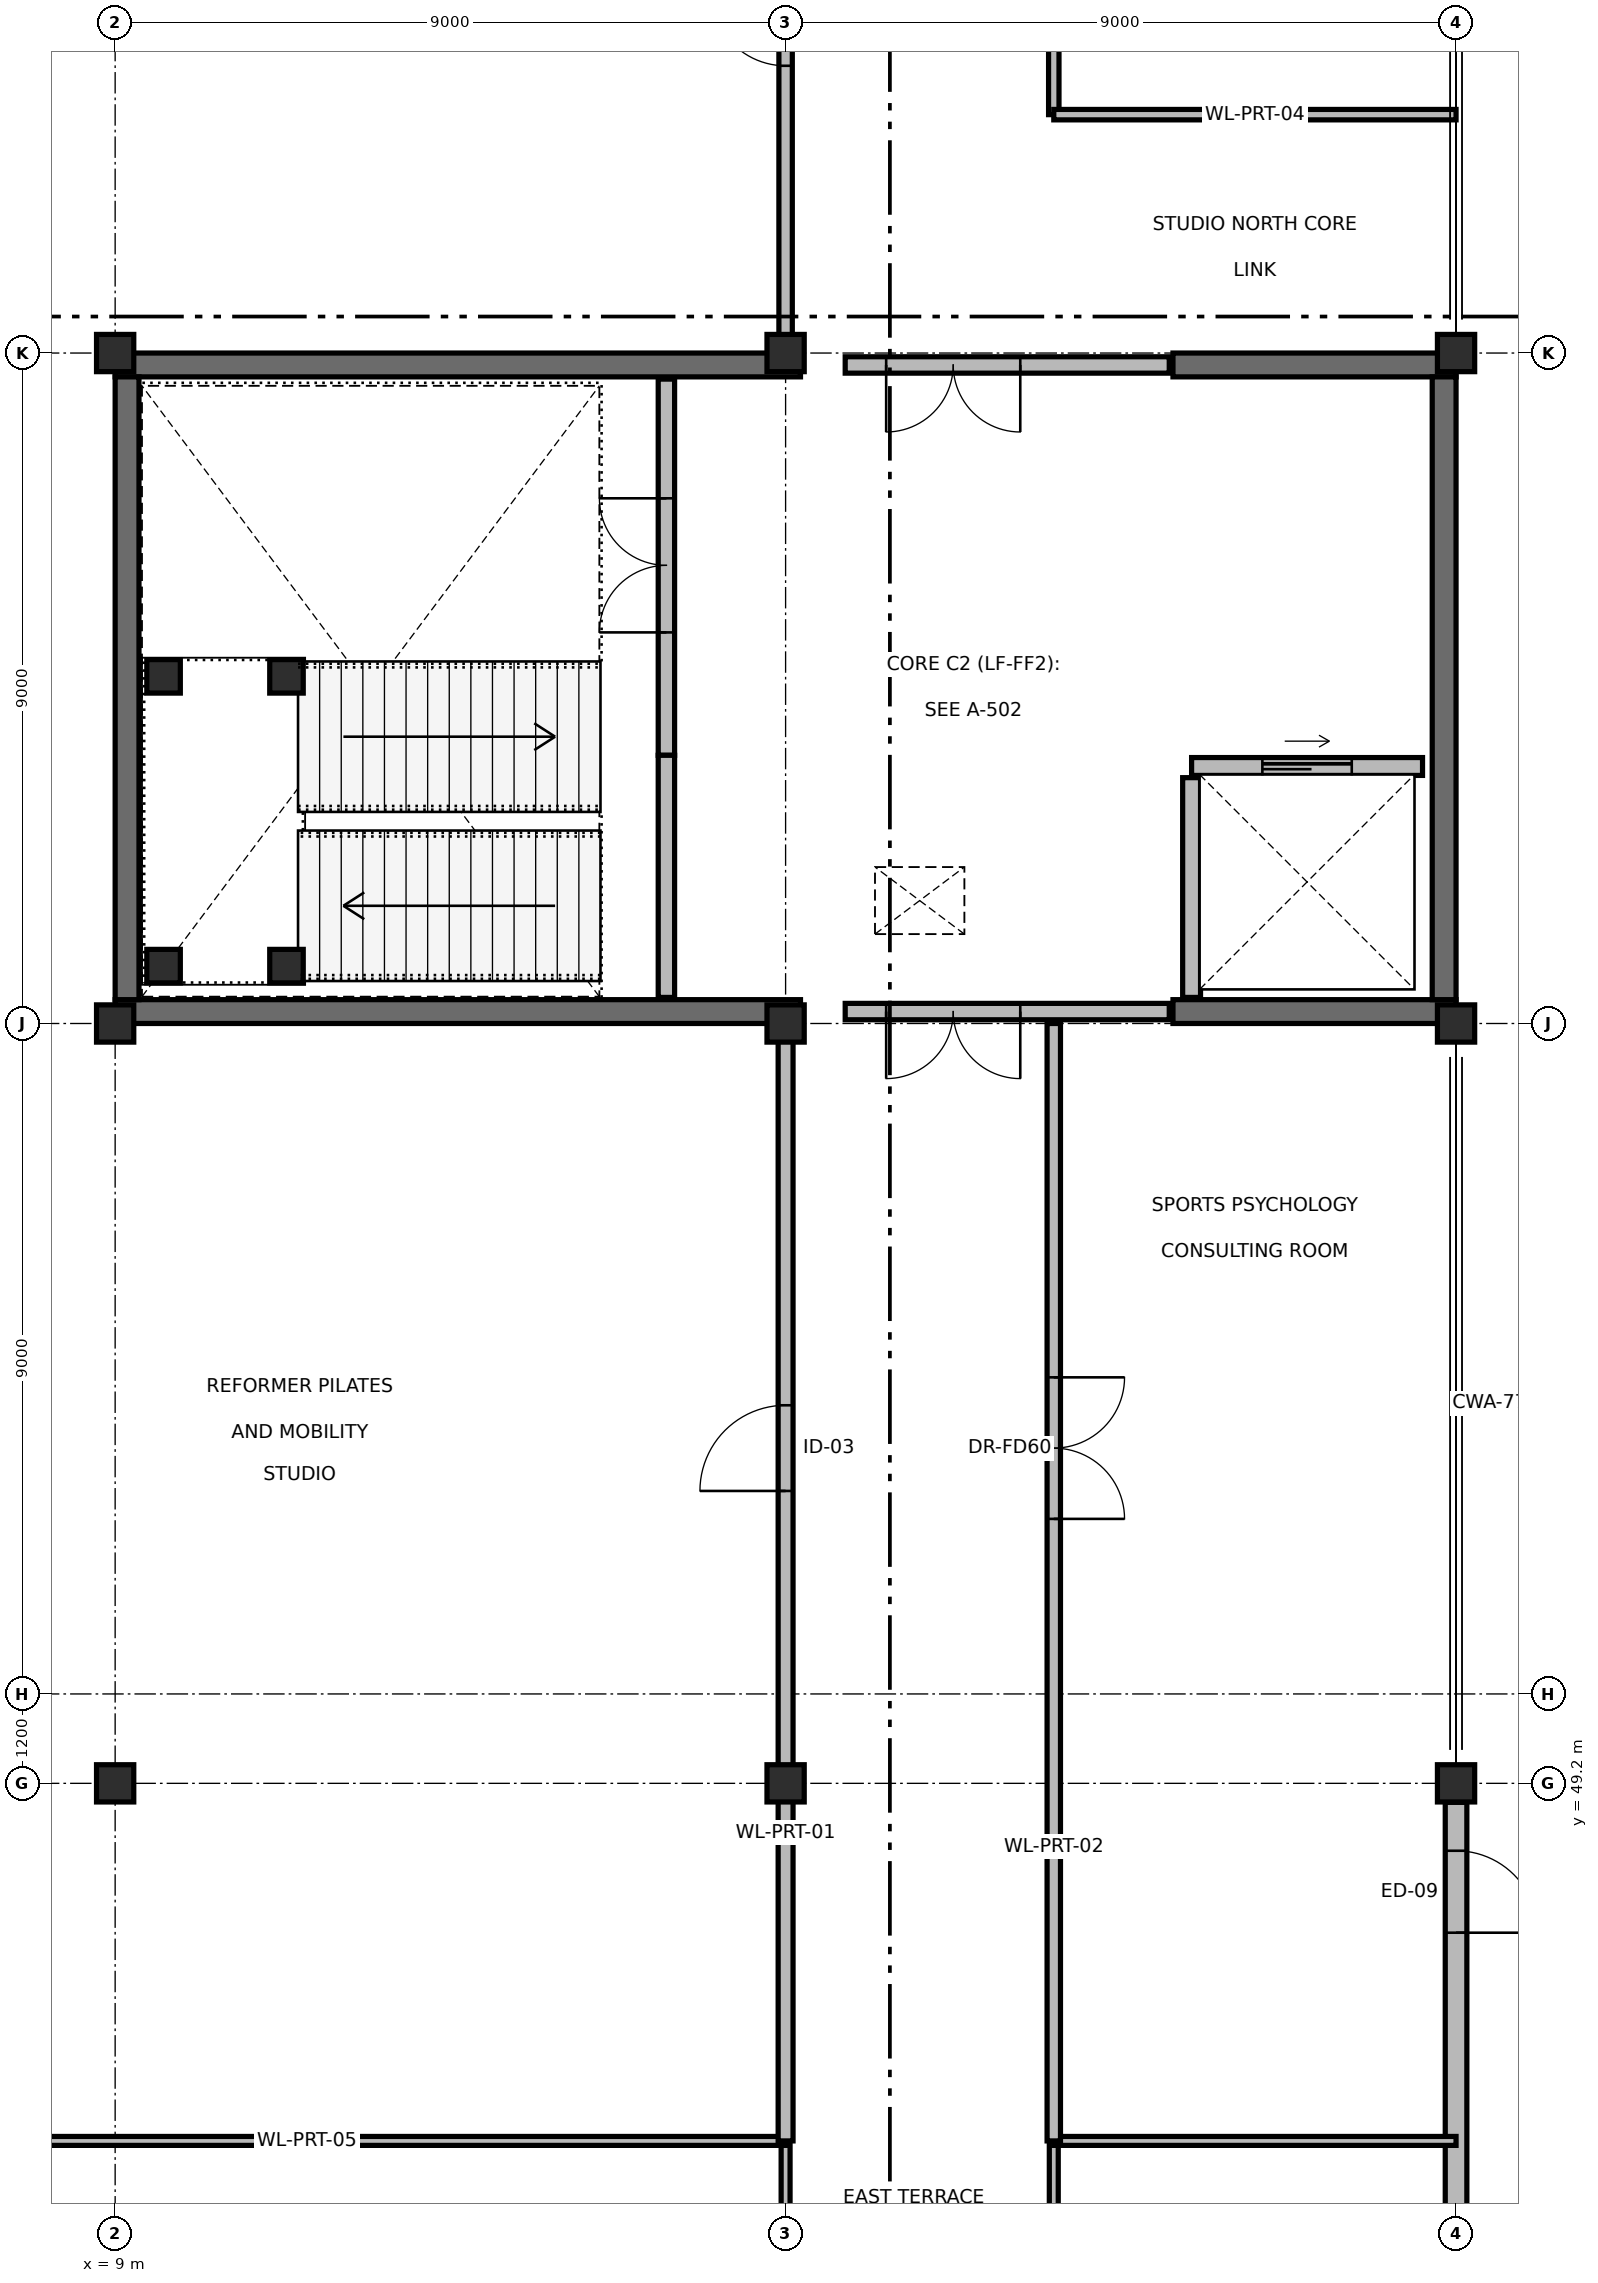
"""IFC4 building model, lengths in metres.
Left out: names, types, materials, properties, quantities, classifications, styles, units other than length and angle.
Written with IfcOpenShell. Run it as: python <this file> out.ifc"""

import sys

from ifc_helpers import new_model, si_unit, direction, frame, frame_2d, origin, origin_2d, place, context, subcontext, project, spatial, rectangle, extrude, element, fill, save


model = new_model("IFC4")
c1 = context("Model", 3, precision=1e-05, world=origin(), true_north=direction((0.0, 1.0)))
c2 = subcontext(c1, "Body", "Model", "MODEL_VIEW")
j1 = project(units=[si_unit("LENGTHUNIT", "METRE"), si_unit("PLANEANGLEUNIT", "RADIAN")], contexts=[c1])
p1 = place(None, origin())
s1 = spatial("IfcSite", under=j1, at=p1, CompositionType="ELEMENT")
p2 = place(p1, origin())
s2 = spatial("IfcBuilding", under=s1, at=p2, CompositionType="ELEMENT")
p3 = place(p2, frame((0.0, 0.0, 14.1)))
s3 = spatial("IfcBuildingStorey", under=s2, at=p3, CompositionType="ELEMENT", Elevation=14.1)
for number, where, z_axis, x_axis in (
    (1, (9.0, 49.2, 0.0), (0.0, 0.0, 1.0), (1.0, 0.0, 0.0)),
    (2, (9.0, 59.4, 0.0), (0.0, 0.0, 1.0), (1.0, 0.0, 0.0)),
    (3, (9.0, 68.4, 0.0), (0.0, 0.0, 1.0), (1.0, 0.0, 0.0)),
    (4, (18.0, 49.2, 0.0), (0.0, 0.0, 1.0), (1.0, 0.0, 0.0)),
    (5, (18.0, 59.4, 0.0), (0.0, 0.0, 1.0), (1.0, 0.0, 0.0)),
    (6, (18.0, 68.4, 0.0), (0.0, 0.0, 1.0), (1.0, 0.0, 0.0)),
    (7, (27.0, 49.2, 0.0), (0.0, 0.0, 1.0), (1.0, 0.0, 0.0)),
    (8, (27.0, 59.4, 0.0), (0.0, 0.0, 1.0), (1.0, 0.0, 0.0)),
    (9, (27.0, 68.4, 0.0), (0.0, 0.0, 1.0), (1.0, 0.0, 0.0)),
):
    element("IfcColumn", number, at=place(p3, frame(where, z_axis=z_axis, x_axis=x_axis)), inside=s3, PredefinedType="COLUMN", context=c2, shape_type="SweptSolid", body=[
        extrude(rectangle(XDim=0.5, YDim=0.5, at=origin_2d()), origin(), (0.0, 0.0, 1.0), 4.5),
    ])
p4 = place(p3, frame((9.0, 59.56, 0.0), z_axis=(0.0, 0.0, 1.0), x_axis=(1.0, 0.0, 0.0)))
e10 = element("IfcWall", 10, at=p4, inside=s3, PredefinedType="SHEAR", context=c2, shape_type="SweptSolid", body=[
    extrude(rectangle(XDim=9.2, YDim=0.32, at=frame_2d((4.6, 0.0))), origin(), (0.0, 0.0, 1.0), 4.5),
])
p5 = place(p3, frame((23.2, 59.56, 0.0), z_axis=(0.0, 0.0, 1.0), x_axis=(1.0, 0.0, 0.0)))
e11 = element("IfcWall", 11, at=p5, inside=s3, PredefinedType="SHEAR", context=c2, shape_type="SweptSolid", body=[
    extrude(rectangle(XDim=3.8, YDim=0.32, at=frame_2d((1.9, 0.0))), origin(), (0.0, 0.0, 1.0), 4.5),
])
p6 = place(p3, frame((9.0, 68.24, 0.0), z_axis=(0.0, 0.0, 1.0), x_axis=(1.0, 0.0, 0.0)))
e12 = element("IfcWall", 12, at=p6, inside=s3, PredefinedType="SHEAR", context=c2, shape_type="SweptSolid", body=[
    extrude(rectangle(XDim=9.2, YDim=0.32, at=frame_2d((4.6, 0.0))), origin(), (0.0, 0.0, 1.0), 4.5),
])
p7 = place(p3, frame((23.2, 68.24, 0.0), z_axis=(0.0, 0.0, 1.0), x_axis=(1.0, 0.0, 0.0)))
e13 = element("IfcWall", 13, at=p7, inside=s3, PredefinedType="SHEAR", context=c2, shape_type="SweptSolid", body=[
    extrude(rectangle(XDim=3.8, YDim=0.32, at=frame_2d((1.9, 0.0))), origin(), (0.0, 0.0, 1.0), 4.5),
])
for number, where, z_axis, x_axis in (
    (14, (9.16, 59.72, 0.0), (0.0, 0.0, 1.0), (0.0, 1.0, 0.0)),
    (15, (26.84, 59.72, 0.0), (0.0, 0.0, 1.0), (0.0, 1.0, 0.0)),
):
    element("IfcWall", number, at=place(p3, frame(where, z_axis=z_axis, x_axis=x_axis)), inside=s3, PredefinedType="SHEAR", context=c2, shape_type="SweptSolid", body=[
        extrude(rectangle(XDim=8.36, YDim=0.32, at=frame_2d((4.18, 0.0))), origin(), (0.0, 0.0, 1.0), 4.5),
    ])
p8 = place(p3, frame((27.0, 48.945, 0.0), z_axis=(0.0, 0.0, 1.0), x_axis=(0.0, -1.0, 0.0)))
e16 = element("IfcWall", 16, at=p8, inside=s3, PredefinedType="SOLIDWALL", context=c2, shape_type="SweptSolid", body=[
    extrude(rectangle(XDim=9.09, YDim=0.29, at=frame_2d((4.545, 0.0))), origin(), (0.0, 0.0, 1.0), 3.535),
])
p9 = place(p8, frame((0.65, 0.0, 0.0)))
e17 = element("IfcOpeningElement", 17, at=p9, cuts=e16, PredefinedType="OPENING", context=c2, shape_type="SweptSolid", body=[
    extrude(rectangle(XDim=1.1, YDim=2.2, at=frame_2d((0.55, 1.1))), frame((0.0, 0.155, 0.0), z_axis=(0.0, -1.0, 0.0), x_axis=(1.0, 0.0, 0.0)), (0.0, 0.0, 1.0), 0.31),
])
p10 = place(p3, frame((16.4, 68.05, 0.0), z_axis=(0.0, 0.0, 1.0), x_axis=(0.0, -1.0, 0.0)))
e18 = element("IfcWall", 18, at=p10, inside=s3, PredefinedType="PARTITIONING", context=c2, shape_type="SweptSolid", body=[
    extrude(rectangle(XDim=5.05, YDim=0.22, at=frame_2d((2.525, 0.0))), origin(), (0.0, 0.0, 1.0), 3.585),
])
p11 = place(p10, frame((1.6, 0.0, 0.0)))
e19 = element("IfcOpeningElement", 19, at=p11, cuts=e18, PredefinedType="OPENING", context=c2, shape_type="SweptSolid", body=[
    extrude(rectangle(XDim=1.8, YDim=2.2, at=frame_2d((0.9, 1.1))), frame((0.0, 0.12, 0.0), z_axis=(0.0, -1.0, 0.0), x_axis=(1.0, 0.0, 0.0)), (0.0, 0.0, 1.0), 0.24),
])
p12 = place(p3, frame((16.4, 59.75, 0.0), z_axis=(0.0, 0.0, 1.0), x_axis=(0.0, 1.0, 0.0)))
e20 = element("IfcWall", 20, at=p12, inside=s3, PredefinedType="PARTITIONING", context=c2, shape_type="SweptSolid", body=[
    extrude(rectangle(XDim=3.25, YDim=0.22, at=frame_2d((1.625, 0.0))), origin(), (0.0, 0.0, 1.0), 3.585),
])
p13 = place(p3, frame((23.45, 62.85, 0.0), z_axis=(0.0, 0.0, 1.0), x_axis=(1.0, 0.0, 0.0)))
e21 = element("IfcWall", 21, at=p13, inside=s3, PredefinedType="SOLIDWALL", context=c2, shape_type="SweptSolid", body=[
    extrude(rectangle(XDim=3.1, YDim=0.24, at=frame_2d((1.55, 0.0))), origin(), (0.0, 0.0, 1.0), 4.205),
])
p14 = place(p13, frame((0.95, 0.0, 0.0)))
e22 = element("IfcOpeningElement", 22, at=p14, cuts=e21, PredefinedType="OPENING", context=c2, shape_type="SweptSolid", body=[
    extrude(rectangle(XDim=1.2, YDim=2.2, at=frame_2d((0.6, 1.1))), frame((0.0, 0.13, 0.0), z_axis=(0.0, -1.0, 0.0), x_axis=(1.0, 0.0, 0.0)), (0.0, 0.0, 1.0), 0.26),
])
p15 = place(p3, frame((23.45, 59.75, 0.0), z_axis=(0.0, 0.0, 1.0), x_axis=(0.0, 1.0, 0.0)))
e23 = element("IfcWall", 23, at=p15, inside=s3, PredefinedType="SOLIDWALL", context=c2, shape_type="SweptSolid", body=[
    extrude(rectangle(XDim=2.95, YDim=0.24, at=frame_2d((1.475, 0.0))), origin(), (0.0, 0.0, 1.0), 3.585),
])
p16 = place(p3, frame((18.8, 59.56, 0.0), z_axis=(0.0, 0.0, 1.0), x_axis=(1.0, 0.0, 0.0)))
e24 = element("IfcWall", 24, at=p16, inside=s3, PredefinedType="PARTITIONING", context=c2, shape_type="SweptSolid", body=[
    extrude(rectangle(XDim=4.35, YDim=0.22, at=frame_2d((2.175, 0.0))), origin(), (0.0, 0.0, 1.0), 3.585),
])
p17 = place(p16, frame((0.55, 0.0, 0.0)))
e25 = element("IfcOpeningElement", 25, at=p17, cuts=e24, PredefinedType="OPENING", context=c2, shape_type="SweptSolid", body=[
    extrude(rectangle(XDim=1.8, YDim=2.2, at=frame_2d((0.9, 1.1))), frame((0.0, 0.12, 0.0), z_axis=(0.0, -1.0, 0.0), x_axis=(1.0, 0.0, 0.0)), (0.0, 0.0, 1.0), 0.24),
])
p18 = place(p3, frame((18.8, 68.24, 0.0), z_axis=(0.0, 0.0, 1.0), x_axis=(1.0, 0.0, 0.0)))
e26 = element("IfcWall", 26, at=p18, inside=s3, PredefinedType="PARTITIONING", context=c2, shape_type="SweptSolid", body=[
    extrude(rectangle(XDim=4.35, YDim=0.22, at=frame_2d((2.175, 0.0))), origin(), (0.0, 0.0, 1.0), 3.585),
])
p19 = place(p18, frame((0.55, 0.0, 0.0)))
e27 = element("IfcOpeningElement", 27, at=p19, cuts=e26, PredefinedType="OPENING", context=c2, shape_type="SweptSolid", body=[
    extrude(rectangle(XDim=1.8, YDim=2.2, at=frame_2d((0.9, 1.1))), frame((0.0, 0.12, 0.0), z_axis=(0.0, -1.0, 0.0), x_axis=(1.0, 0.0, 0.0)), (0.0, 0.0, 1.0), 0.24),
])
p20 = place(p3, frame((18.0, 22.2, 0.0), z_axis=(0.0, 0.0, 1.0), x_axis=(0.0, 1.0, 0.0)))
e28 = element("IfcWall", 28, at=p20, inside=s3, PredefinedType="PARTITIONING", context=c2, shape_type="SweptSolid", body=[
    extrude(rectangle(XDim=22.2, YDim=0.12, at=frame_2d((11.1, 0.0))), origin(), (0.0, 0.0, 1.0), 3.485),
])
p21 = place(p20, frame((10.65, 0.0, 0.0)))
e29 = element("IfcOpeningElement", 29, at=p21, cuts=e28, PredefinedType="OPENING", context=c2, shape_type="SweptSolid", body=[
    extrude(rectangle(XDim=0.9, YDim=2.1, at=frame_2d((0.45, 1.05))), frame((0.0, 0.07, 0.0), z_axis=(0.0, -1.0, 0.0), x_axis=(1.0, 0.0, 0.0)), (0.0, 0.0, 1.0), 0.14),
])
p22 = place(p3, frame((0.0, 44.4, 0.0), z_axis=(0.0, 0.0, 1.0), x_axis=(1.0, 0.0, 0.0)))
e30 = element("IfcWall", 30, at=p22, inside=s3, PredefinedType="PARTITIONING", context=c2, shape_type="SweptSolid", body=[
    extrude(rectangle(XDim=18.0, YDim=0.12, at=frame_2d((9.0, 0.0))), origin(), (0.0, 0.0, 1.0), 3.535),
])
p23 = place(p3, frame((18.0, 44.4, 0.0), z_axis=(0.0, 0.0, 1.0), x_axis=(0.0, 1.0, 0.0)))
e31 = element("IfcWall", 31, at=p23, inside=s3, PredefinedType="PARTITIONING", context=c2, shape_type="SweptSolid", body=[
    extrude(rectangle(XDim=15.0, YDim=0.2, at=frame_2d((7.5, 0.0))), origin(), (0.0, 0.0, 1.0), 3.485),
])
p24 = place(p23, frame((8.725, 0.0, 0.0)))
e32 = element("IfcOpeningElement", 32, at=p24, cuts=e31, PredefinedType="OPENING", context=c2, shape_type="SweptSolid", body=[
    extrude(rectangle(XDim=1.15, YDim=2.2, at=frame_2d((0.575, 1.1))), frame((0.0, 0.11, 0.0), z_axis=(0.0, -1.0, 0.0), x_axis=(1.0, 0.0, 0.0)), (0.0, 0.0, 1.0), 0.22),
])
p25 = place(p3, frame((18.0, 68.4, 0.0), z_axis=(0.0, 0.0, 1.0), x_axis=(0.0, 1.0, 0.0)))
e33 = element("IfcWall", 33, at=p25, inside=s3, PredefinedType="PARTITIONING", context=c2, shape_type="SweptSolid", body=[
    extrude(rectangle(XDim=19.8, YDim=0.18, at=frame_2d((9.9, 0.0))), origin(), (0.0, 0.0, 1.0), 3.485),
])
p26 = place(p25, frame((3.856, 0.0, 0.0)))
e34 = element("IfcOpeningElement", 34, at=p26, cuts=e33, PredefinedType="OPENING", context=c2, shape_type="SweptSolid", body=[
    extrude(rectangle(XDim=1.0, YDim=2.1, at=frame_2d((0.5, 1.05))), frame((0.0, 0.1, 0.0), z_axis=(0.0, -1.0, 0.0), x_axis=(1.0, 0.0, 0.0)), (0.0, 0.0, 1.0), 0.2),
])
p27 = place(p3, frame((21.6, 25.4, 0.0), z_axis=(0.0, 0.0, 1.0), x_axis=(0.0, 1.0, 0.0)))
e35 = element("IfcWall", 35, at=p27, inside=s3, PredefinedType="PARTITIONING", context=c2, shape_type="SweptSolid", body=[
    extrude(rectangle(XDim=19.0, YDim=0.12, at=frame_2d((9.5, 0.0))), origin(), (0.0, 0.0, 1.0), 3.585),
])
p28 = place(p27, frame((9.05, 0.0, 0.0)))
e36 = element("IfcOpeningElement", 36, at=p28, cuts=e35, PredefinedType="OPENING", context=c2, shape_type="SweptSolid", body=[
    extrude(rectangle(XDim=0.9, YDim=2.1, at=frame_2d((0.45, 1.05))), frame((0.0, 0.07, 0.0), z_axis=(0.0, -1.0, 0.0), x_axis=(1.0, 0.0, 0.0)), (0.0, 0.0, 1.0), 0.14),
])
p29 = place(p3, frame((21.6, 44.4, 0.0), z_axis=(0.0, 0.0, 1.0), x_axis=(1.0, 0.0, 0.0)))
e37 = element("IfcWall", 37, at=p29, inside=s3, PredefinedType="PARTITIONING", context=c2, shape_type="SweptSolid", body=[
    extrude(rectangle(XDim=5.4, YDim=0.12, at=frame_2d((2.7, 0.0))), origin(), (0.0, 0.0, 1.0), 3.535),
])
p30 = place(p3, frame((21.6, 44.4, 0.0), z_axis=(0.0, 0.0, 1.0), x_axis=(0.0, 1.0, 0.0)))
e38 = element("IfcWall", 38, at=p30, inside=s3, PredefinedType="PARTITIONING", context=c2, shape_type="SweptSolid", body=[
    extrude(rectangle(XDim=15.0, YDim=0.18, at=frame_2d((7.5, 0.0))), origin(), (0.0, 0.0, 1.0), 3.585),
])
p31 = place(p30, frame((8.35, 0.0, 0.0)))
e39 = element("IfcOpeningElement", 39, at=p31, cuts=e38, PredefinedType="OPENING", context=c2, shape_type="SweptSolid", body=[
    extrude(rectangle(XDim=1.9, YDim=2.2, at=frame_2d((0.95, 1.1))), frame((0.0, 0.1, 0.0), z_axis=(0.0, -1.0, 0.0), x_axis=(1.0, 0.0, 0.0)), (0.0, 0.0, 1.0), 0.2),
])
p32 = place(p3, frame((21.6, 71.6, 0.0), z_axis=(0.0, 0.0, 1.0), x_axis=(0.0, 1.0, 0.0)))
e40 = element("IfcWall", 40, at=p32, inside=s3, PredefinedType="PARTITIONING", context=c2, shape_type="SweptSolid", body=[
    extrude(rectangle(XDim=16.6, YDim=0.14, at=frame_2d((8.3, 0.0))), origin(), (0.0, 0.0, 1.0), 3.585),
])
p33 = place(p32, frame((9.817, 0.0, 0.0)))
e41 = element("IfcOpeningElement", 41, at=p33, cuts=e40, PredefinedType="OPENING", context=c2, shape_type="SweptSolid", body=[
    extrude(rectangle(XDim=0.95, YDim=2.1, at=frame_2d((0.475, 1.05))), frame((0.0, 0.08, 0.0), z_axis=(0.0, -1.0, 0.0), x_axis=(1.0, 0.0, 0.0)), (0.0, 0.0, 1.0), 0.16),
])
p34 = place(p3, frame((21.6, 71.6, 0.0), z_axis=(0.0, 0.0, 1.0), x_axis=(1.0, 0.0, 0.0)))
e42 = element("IfcWall", 42, at=p34, inside=s3, PredefinedType="PARTITIONING", context=c2, shape_type="SweptSolid", body=[
    extrude(rectangle(XDim=5.4, YDim=0.14, at=frame_2d((2.7, 0.0))), origin(), (0.0, 0.0, 1.0), 3.535),
])
for number, where, z_axis, x_axis in (
    (43, (9.65, 60.17, 0.0), (0.0, 0.0, 1.0), (1.0, 0.0, 0.0)),
    (44, (11.3, 60.17, 0.0), (0.0, 0.0, 1.0), (1.0, 0.0, 0.0)),
    (45, (9.65, 64.06, 0.0), (0.0, 0.0, 1.0), (1.0, 0.0, 0.0)),
    (46, (11.3, 64.06, 0.0), (0.0, 0.0, 1.0), (1.0, 0.0, 0.0)),
):
    element("IfcColumn", number, at=place(p3, frame(where, z_axis=z_axis, x_axis=x_axis)), inside=s3, PredefinedType="COLUMN", context=c2, shape_type="SweptSolid", body=[
        extrude(rectangle(XDim=0.45, YDim=0.45, at=origin_2d()), origin(), (0.0, 0.0, 1.0), 4.5),
    ])
p35 = place(p9, origin())
e47 = element("IfcDoor", 47, at=p35, inside=s3, OperationType="SINGLE_SWING_RIGHT", PredefinedType="DOOR", context=c2, shape_type="SweptSolid", body=[
    extrude(rectangle(XDim=1.1, YDim=2.2, at=frame_2d((0.55, 1.1))), frame((0.0, 0.025, 0.0), z_axis=(0.0, -1.0, 0.0), x_axis=(1.0, 0.0, 0.0)), (0.0, 0.0, 1.0), 0.05),
])
fill(e17, e47)
p36 = place(p11, origin())
e48 = element("IfcDoor", 48, at=p36, inside=s3, OperationType="DOUBLE_DOOR_SINGLE_SWING", PredefinedType="DOOR", context=c2, shape_type="SweptSolid", body=[
    extrude(rectangle(XDim=1.8, YDim=2.2, at=frame_2d((0.9, 1.1))), frame((0.0, 0.025, 0.0), z_axis=(0.0, -1.0, 0.0), x_axis=(1.0, 0.0, 0.0)), (0.0, 0.0, 1.0), 0.05),
])
fill(e19, e48)
p37 = place(p14, origin())
e49 = element("IfcDoor", 49, at=p37, inside=s3, OperationType="DOUBLE_DOOR_SLIDING", PredefinedType="DOOR", context=c2, shape_type="SweptSolid", body=[
    extrude(rectangle(XDim=1.2, YDim=2.2, at=frame_2d((0.6, 1.1))), frame((0.0, 0.025, 0.0), z_axis=(0.0, -1.0, 0.0), x_axis=(1.0, 0.0, 0.0)), (0.0, 0.0, 1.0), 0.05),
])
fill(e22, e49)
p38 = place(p17, origin())
e50 = element("IfcDoor", 50, at=p38, inside=s3, OperationType="DOUBLE_DOOR_SINGLE_SWING", PredefinedType="DOOR", context=c2, shape_type="SweptSolid", body=[
    extrude(rectangle(XDim=1.8, YDim=2.2, at=frame_2d((0.9, 1.1))), frame((0.0, 0.025, 0.0), z_axis=(0.0, -1.0, 0.0), x_axis=(1.0, 0.0, 0.0)), (0.0, 0.0, 1.0), 0.05),
])
fill(e25, e50)
p39 = place(p19, origin())
e51 = element("IfcDoor", 51, at=p39, inside=s3, OperationType="DOUBLE_DOOR_SINGLE_SWING", PredefinedType="DOOR", context=c2, shape_type="SweptSolid", body=[
    extrude(rectangle(XDim=1.8, YDim=2.2, at=frame_2d((0.9, 1.1))), frame((0.0, 0.025, 0.0), z_axis=(0.0, -1.0, 0.0), x_axis=(1.0, 0.0, 0.0)), (0.0, 0.0, 1.0), 0.05),
])
fill(e27, e51)
p40 = place(p24, origin())
e52 = element("IfcDoor", 52, at=p40, inside=s3, OperationType="SINGLE_SWING_LEFT", PredefinedType="DOOR", context=c2, shape_type="SweptSolid", body=[
    extrude(rectangle(XDim=1.15, YDim=2.2, at=frame_2d((0.575, 1.1))), frame((0.0, 0.025, 0.0), z_axis=(0.0, -1.0, 0.0), x_axis=(1.0, 0.0, 0.0)), (0.0, 0.0, 1.0), 0.05),
])
fill(e32, e52)
p41 = place(p26, origin())
e53 = element("IfcDoor", 53, at=p41, inside=s3, OperationType="SINGLE_SWING_RIGHT", PredefinedType="DOOR", context=c2, shape_type="SweptSolid", body=[
    extrude(rectangle(XDim=1.0, YDim=2.1, at=frame_2d((0.5, 1.05))), frame((0.0, 0.025, 0.0), z_axis=(0.0, -1.0, 0.0), x_axis=(1.0, 0.0, 0.0)), (0.0, 0.0, 1.0), 0.05),
])
fill(e34, e53)
p42 = place(p31, origin())
e54 = element("IfcDoor", 54, at=p42, inside=s3, OperationType="DOUBLE_DOOR_SINGLE_SWING", PredefinedType="DOOR", context=c2, shape_type="SweptSolid", body=[
    extrude(rectangle(XDim=1.9, YDim=2.2, at=frame_2d((0.95, 1.1))), frame((0.0, 0.025, 0.0), z_axis=(0.0, -1.0, 0.0), x_axis=(1.0, 0.0, 0.0)), (0.0, 0.0, 1.0), 0.05),
])
fill(e39, e54)
save(model, sys.argv[1])
